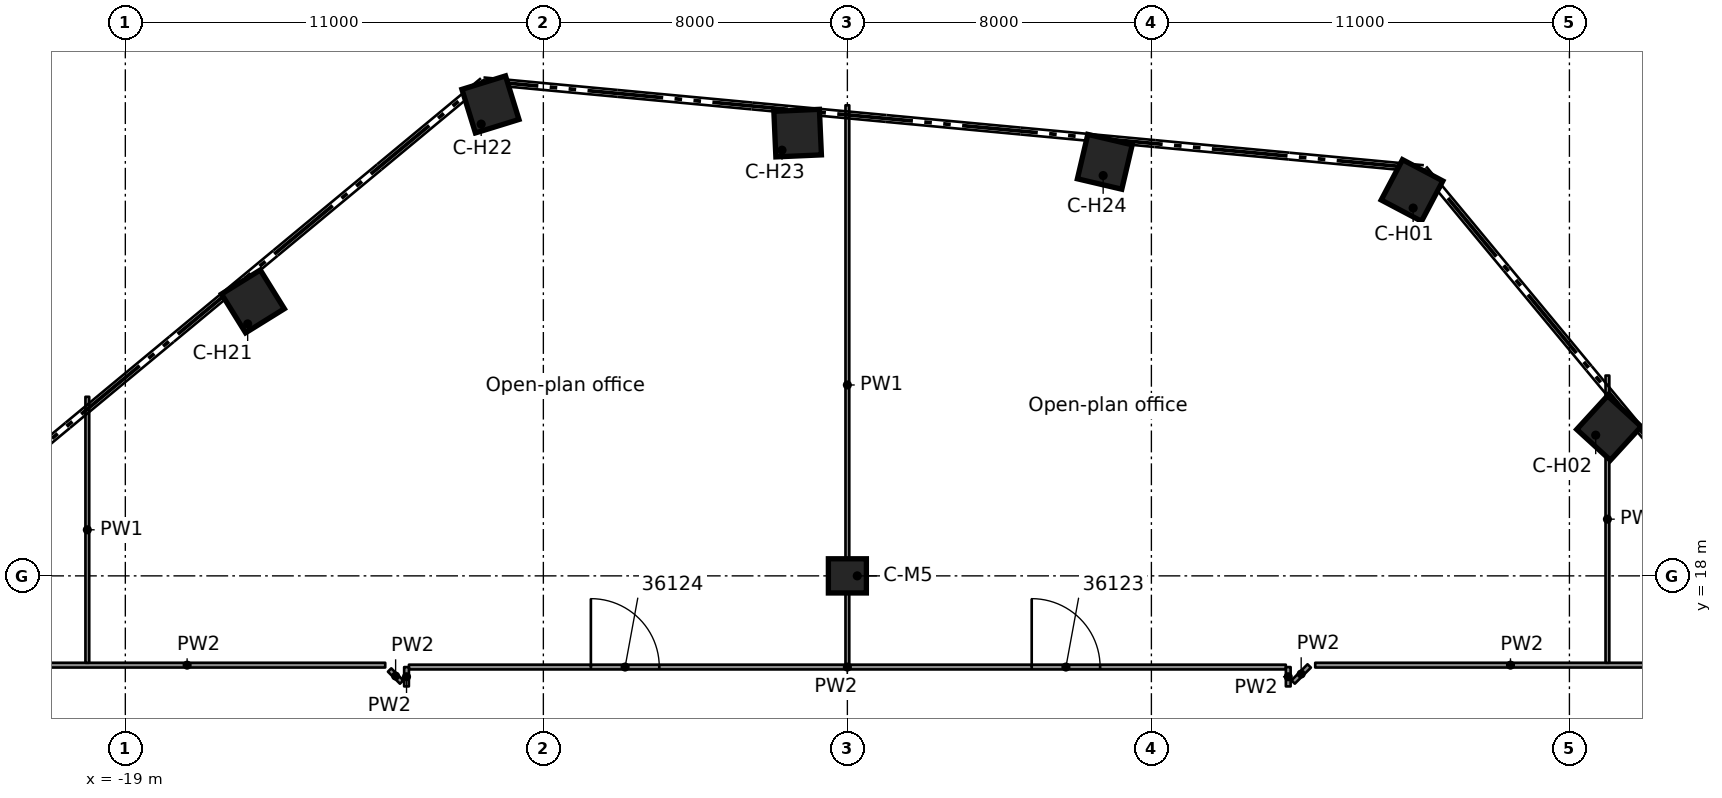
"""IFC4 building model, lengths in metres.
Left out: names, types, materials, properties, quantities, classifications, styles, units other than length and angle.
Written with IfcOpenShell. Run it as: python <this file> out.ifc"""

import sys

from ifc_helpers import new_model, si_unit, direction, frame, frame_2d, origin, origin_2d, place, context, subcontext, project, spatial, rectangle, extrude, element, fill, save


model = new_model("IFC4")
c1 = context("Model", 3, precision=1e-05, world=origin(), true_north=direction((0.0, 1.0)))
c2 = subcontext(c1, "Body", "Model", "MODEL_VIEW")
j1 = project(units=[si_unit("LENGTHUNIT", "METRE"), si_unit("PLANEANGLEUNIT", "RADIAN")], contexts=[c1])
p1 = place(None, origin())
s1 = spatial("IfcSite", under=j1, at=p1, CompositionType="ELEMENT")
p2 = place(p1, origin())
s2 = spatial("IfcBuilding", under=s1, at=p2, CompositionType="ELEMENT")
p3 = place(p2, frame((0.0, 0.0, 181.1)))
s3 = spatial("IfcBuildingStorey", under=s2, at=p3, CompositionType="ELEMENT", Elevation=181.1)
for number, where, z_axis, x_axis in (
    (1, (14.858, 28.141, 0.0), (0.0, 0.0, 1.0), (0.467, 0.884, 0.0)),
    (2, (20.04, 21.891, 0.0), (0.0, 0.0, 1.0), (0.675, 0.738, 0.0)),
    (3, (-15.642, 25.222, 0.0), (0.0, 0.0, 1.0), (-0.527, 0.85, 0.0)),
    (4, (-9.392, 30.405, 0.0), (0.0, 0.0, 1.0), (-0.295, 0.955, 0.0)),
    (5, (-1.309, 29.65, 0.0), (0.0, 0.0, 1.0), (-0.044, 0.999, 0.0)),
    (6, (6.774, 28.895, 0.0), (0.0, 0.0, 1.0), (0.228, 0.974, 0.0)),
):
    element("IfcColumn", number, at=place(p3, frame(where, z_axis=z_axis, x_axis=x_axis)), inside=s3, PredefinedType="COLUMN", context=c2, shape_type="SweptSolid", body=[
        extrude(rectangle(XDim=1.2, YDim=1.2, at=origin_2d()), origin(), (0.0, 0.0, 1.0), 3.5),
    ])
p4 = place(p3, frame((0.0, 18.0, 0.0), z_axis=(0.0, 0.0, 1.0), x_axis=(1.0, 0.0, 0.0)))
e7 = element("IfcColumn", 7, at=p4, inside=s3, PredefinedType="COLUMN", context=c2, shape_type="SweptSolid", body=[
    extrude(rectangle(XDim=1.0, YDim=0.9, at=origin_2d()), origin(), (0.0, 0.0, 1.0), 3.5),
])
p5 = place(p3, frame((-12.046, 15.523, 0.0), z_axis=(0.0, 0.0, 1.0), x_axis=(0.707106781187, -0.707106781187, 0.0)))
e8 = element("IfcWall", 8, at=p5, inside=s3, PredefinedType="PARTITIONING", context=c2, shape_type="SweptSolid", body=[
    extrude(rectangle(XDim=0.448, YDim=0.125, at=frame_2d((0.224, 0.0))), origin(), (0.0, 0.0, 1.0), 3.06),
])
p6 = place(p3, frame((-11.537, 15.601, 0.0), z_axis=(0.0, 0.0, 1.0), x_axis=(1.0, 0.0, 0.0)))
e9 = element("IfcWall", 9, at=p6, inside=s3, PredefinedType="PARTITIONING", context=c2, shape_type="SweptSolid", body=[
    extrude(rectangle(XDim=23.074, YDim=0.125, at=frame_2d((11.537, 0.0))), origin(), (0.0, 0.0, 1.0), 3.06),
])
p7 = place(p6, frame((16.387, 0.0, 0.0)))
e10 = element("IfcOpeningElement", 10, at=p7, cuts=e9, PredefinedType="OPENING", context=c2, shape_type="SweptSolid", body=[
    extrude(rectangle(XDim=1.8, YDim=2.1, at=frame_2d((0.9, 1.05))), frame((0.0, 0.073, 0.0), z_axis=(0.0, -1.0, 0.0), x_axis=(1.0, 0.0, 0.0)), (0.0, 0.0, 1.0), 0.145),
])
p8 = place(p6, frame((4.788, 0.0, 0.0)))
e11 = element("IfcOpeningElement", 11, at=p8, cuts=e9, PredefinedType="OPENING", context=c2, shape_type="SweptSolid", body=[
    extrude(rectangle(XDim=1.8, YDim=2.1, at=frame_2d((0.9, 1.05))), frame((0.0, 0.073, 0.0), z_axis=(0.0, -1.0, 0.0), x_axis=(1.0, 0.0, 0.0)), (0.0, 0.0, 1.0), 0.145),
])
p9 = place(p3, frame((-22.587, 15.651, 0.0), z_axis=(0.0, 0.0, 1.0), x_axis=(1.0, 0.0, 0.0)))
e12 = element("IfcWall", 12, at=p9, inside=s3, PredefinedType="PARTITIONING", context=c2, shape_type="SweptSolid", body=[
    extrude(rectangle(XDim=10.426, YDim=0.125, at=frame_2d((5.213, 0.0))), origin(), (0.0, 0.0, 1.0), 3.06),
])
p10 = place(p3, frame((12.311, 15.651, 0.0), z_axis=(0.0, 0.0, 1.0), x_axis=(1.0, 0.0, 0.0)))
e13 = element("IfcWall", 13, at=p10, inside=s3, PredefinedType="PARTITIONING", context=c2, shape_type="SweptSolid", body=[
    extrude(rectangle(XDim=10.276, YDim=0.125, at=frame_2d((5.138, 0.0))), origin(), (0.0, 0.0, 1.0), 3.06),
])
p11 = place(p3, frame((11.73, 15.207, 0.0), z_axis=(0.0, 0.0, 1.0), x_axis=(0.707310822952, 0.706902680526, 0.0)))
e14 = element("IfcWall", 14, at=p11, inside=s3, PredefinedType="PARTITIONING", context=c2, shape_type="SweptSolid", body=[
    extrude(rectangle(XDim=0.598, YDim=0.125, at=frame_2d((0.299, 0.0))), origin(), (0.0, 0.0, 1.0), 3.06),
])
p12 = place(p3, frame((-11.601, 15.092, 0.0), z_axis=(0.0, 0.0, 1.0), x_axis=(0.00192214926, 0.999998152669, 0.0)))
e15 = element("IfcWall", 15, at=p12, inside=s3, PredefinedType="PARTITIONING", context=c2, shape_type="SweptSolid", body=[
    extrude(rectangle(XDim=0.508, YDim=0.125, at=frame_2d((0.254, 0.0))), origin(), (0.0, 0.0, 1.0), 3.06),
])
p13 = place(p3, frame((20.0, 15.713, 0.0), z_axis=(0.0, 0.0, 1.0), x_axis=(0.0, 1.0, 0.0)))
e16 = element("IfcWall", 16, at=p13, inside=s3, PredefinedType="PARTITIONING", context=c2, shape_type="SweptSolid", body=[
    extrude(rectangle(XDim=7.558, YDim=0.1, at=frame_2d((3.779, 0.0))), origin(), (0.0, 0.0, 1.0), 3.06),
])
p14 = place(p3, frame((11.601, 15.092, 0.0), z_axis=(0.0, 0.0, 1.0), x_axis=(0.0, 1.0, 0.0)))
e17 = element("IfcWall", 17, at=p14, inside=s3, PredefinedType="PARTITIONING", context=c2, shape_type="SweptSolid", body=[
    extrude(rectangle(XDim=0.508, YDim=0.125, at=frame_2d((0.254, 0.0))), origin(), (0.0, 0.0, 1.0), 3.06),
])
p15 = place(p3, frame((0.0, 15.664, 0.0), z_axis=(0.0, 0.0, 1.0), x_axis=(0.0, 1.0, 0.0)))
e18 = element("IfcWall", 18, at=p15, inside=s3, PredefinedType="PARTITIONING", context=c2, shape_type="SweptSolid", body=[
    extrude(rectangle(XDim=14.718, YDim=0.1, at=frame_2d((7.359, 0.0))), origin(), (0.0, 0.0, 1.0), 3.06),
])
p16 = place(p3, frame((-20.0, 15.713, 0.0), z_axis=(0.0, 0.0, 1.0), x_axis=(0.0, 1.0, 0.0)))
e19 = element("IfcWall", 19, at=p16, inside=s3, PredefinedType="PARTITIONING", context=c2, shape_type="SweptSolid", body=[
    extrude(rectangle(XDim=6.999, YDim=0.1, at=frame_2d((3.5, 0.0))), origin(), (0.0, 0.0, 1.0), 3.06),
])
p17 = place(p7, origin())
e20 = element("IfcDoor", 20, at=p17, inside=s3, OperationType="DOUBLE_DOOR_SINGLE_SWING", PredefinedType="DOOR", context=c2, shape_type="SweptSolid", body=[
    extrude(rectangle(XDim=1.8, YDim=2.1, at=frame_2d((0.9, 1.05))), frame((0.0, 0.025, 0.0), z_axis=(0.0, -1.0, 0.0), x_axis=(1.0, 0.0, 0.0)), (0.0, 0.0, 1.0), 0.05),
])
fill(e10, e20)
p18 = place(p8, origin())
e21 = element("IfcDoor", 21, at=p18, inside=s3, OperationType="DOUBLE_DOOR_SINGLE_SWING", PredefinedType="DOOR", context=c2, shape_type="SweptSolid", body=[
    extrude(rectangle(XDim=1.8, YDim=2.1, at=frame_2d((0.9, 1.05))), frame((0.0, 0.025, 0.0), z_axis=(0.0, -1.0, 0.0), x_axis=(1.0, 0.0, 0.0)), (0.0, 0.0, 1.0), 0.05),
])
fill(e11, e21)
save(model, sys.argv[1])
